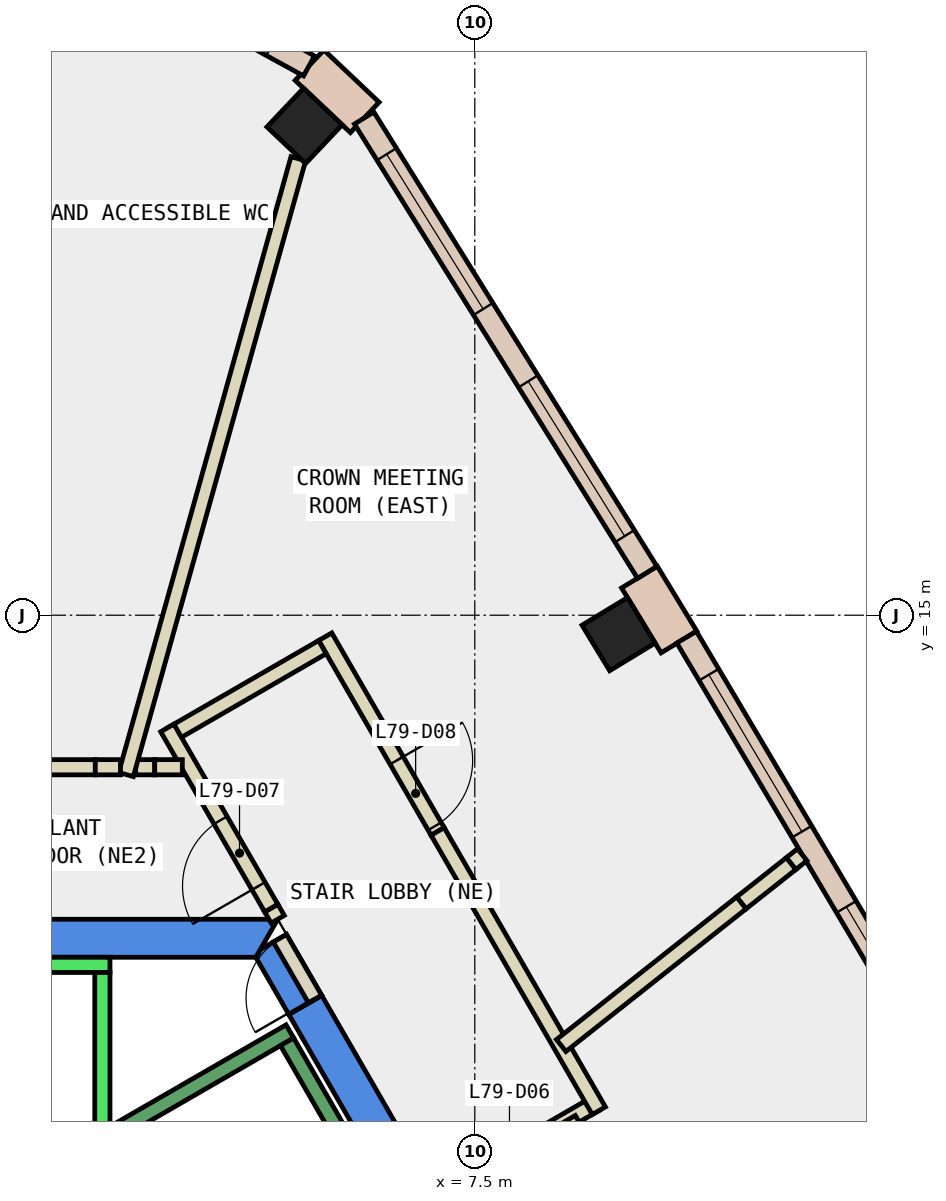
"""IFC4 building model, lengths in metres.
Left out: names, types, materials, properties, quantities, classifications, styles, units other than length and angle.
Written with IfcOpenShell. Run it as: python <this file> out.ifc"""

import sys

from ifc_helpers import new_model, si_unit, direction, frame, frame_2d, origin, origin_2d, place, context, subcontext, project, spatial, polyline, rectangle, outline, extrude, element, fill, save


model = new_model("IFC4")
c1 = context("Model", 3, precision=1e-05, world=origin(), true_north=direction((0.0, 1.0)))
c2 = subcontext(c1, "Body", "Model", "MODEL_VIEW")
j1 = project(units=[si_unit("LENGTHUNIT", "METRE"), si_unit("PLANEANGLEUNIT", "RADIAN")], contexts=[c1])
p1 = place(None, origin())
s1 = spatial("IfcSite", under=j1, at=p1, CompositionType="ELEMENT")
p2 = place(p1, origin())
s2 = spatial("IfcBuilding", under=s1, at=p2, CompositionType="ELEMENT")
p3 = place(p2, frame((0.0, 0.0, 335.9)))
s3 = spatial("IfcBuildingStorey", under=s2, at=p3, CompositionType="ELEMENT", Elevation=335.9)
for number, where, z_axis, x_axis in (
    (1, (9.392, 14.751, -0.35), (0.0, 0.0, 1.0), (-0.519, 0.855, 0.0)),
    (2, (5.26, 21.438, -0.35), (0.0, 0.0, 1.0), (-0.727, 0.687, 0.0)),
):
    element("IfcColumn", number, at=place(p3, frame(where, z_axis=z_axis, x_axis=x_axis)), inside=s3, PredefinedType="COLUMN", context=c2, shape_type="SweptSolid", body=[
        extrude(rectangle(XDim=0.7, YDim=0.7, at=origin_2d()), origin(), (0.0, 0.0, 1.0), 4.4),
    ])
p4 = place(p3, frame((0.0, 0.0, -0.35)))
e3 = element("IfcWall", 3, at=p4, inside=s3, PredefinedType="SHEAR", context=c2, shape_type="SweptSolid", body=[
    extrude(outline(polyline([(5.486, 9.998), (5.053, 9.748), (9.238, 2.5), (9.815, 2.5), (5.486, 9.998)])), origin(), (0.0, 0.0, 1.0), 4.4),
])
p5 = place(p3, frame((0.0, 0.0, 3.6)))
e4 = element("IfcWall", 4, at=p5, inside=s3, PredefinedType="SHEAR", context=c2, shape_type="SweptSolid", body=[
    extrude(outline(polyline([(5.022, 10.8), (4.677, 10.601), (4.619, 10.5), (5.053, 9.748), (5.486, 9.998), (5.022, 10.8)])), origin(), (0.0, 0.0, 1.0), 0.45),
])
p6 = place(p3, frame((0.0, 0.0, -0.35)))
e5 = element("IfcWall", 5, at=p6, inside=s3, PredefinedType="SHEAR", context=c2, shape_type="SweptSolid", body=[
    extrude(outline(polyline([(4.907, 11.0), (-4.907, 11.0), (-4.619, 10.5), (4.619, 10.5), (4.907, 11.0)])), origin(), (0.0, 0.0, 1.0), 4.4),
])
p7 = place(p3, frame((10.186, 14.648, 0.0), z_axis=(0.0, 0.0, 1.0), x_axis=(-0.520086370604, 0.854113673414, 0.0)))
e6 = element("IfcWall", 6, at=p7, inside=s3, PredefinedType="STANDARD", context=c2, shape_type="SweptSolid", body=[
    extrude(rectangle(XDim=1.0, YDim=0.55, at=frame_2d((0.5, 0.0))), origin(), (0.0, 0.0, 1.0), 4.05),
])
p8 = place(p3, frame((6.052, 21.549, 0.0), z_axis=(0.0, 0.0, 1.0), x_axis=(-0.726376136967, 0.687297393888, 0.0)))
e7 = element("IfcWall", 7, at=p8, inside=s3, PredefinedType="STANDARD", context=c2, shape_type="SweptSolid", body=[
    extrude(rectangle(XDim=1.0, YDim=0.55, at=frame_2d((0.5, 0.0))), origin(), (0.0, 0.0, 1.0), 4.05),
])
p9 = place(p3, frame((13.905, 8.604, 0.0), z_axis=(0.0, 0.0, 1.0), x_axis=(-0.509697735304, 0.86035354281, 0.0)))
e8 = element("IfcWall", 8, at=p9, inside=s3, PredefinedType="STANDARD", context=c2, shape_type="SweptSolid", body=[
    extrude(rectangle(XDim=7.098, YDim=0.3, at=frame_2d((3.549, 0.0))), origin(), (0.0, 0.0, 1.0), 4.05),
])
p10 = place(p9, frame((0.575, 0.0, 0.9)))
e9 = element("IfcOpeningElement", 9, at=p10, cuts=e8, PredefinedType="OPENING", context=c2, shape_type="SweptSolid", body=[
    extrude(rectangle(XDim=2.4, YDim=3.0, at=frame_2d((1.2, 1.5))), frame((0.0, 0.16, 0.0), z_axis=(0.0, -1.0, 0.0), x_axis=(1.0, 0.0, 0.0)), (0.0, 0.0, 1.0), 0.32),
])
p11 = place(p9, frame((4.124, 0.0, 0.9)))
e10 = element("IfcOpeningElement", 10, at=p11, cuts=e8, PredefinedType="OPENING", context=c2, shape_type="SweptSolid", body=[
    extrude(rectangle(XDim=2.4, YDim=3.0, at=frame_2d((1.2, 1.5))), frame((0.0, 0.16, 0.0), z_axis=(0.0, -1.0, 0.0), x_axis=(1.0, 0.0, 0.0)), (0.0, 0.0, 1.0), 0.32),
])
p12 = place(p3, frame((9.769, 15.564, 0.0), z_axis=(0.0, 0.0, 1.0), x_axis=(-0.528920387505, 0.848671446251, 0.0)))
e11 = element("IfcWall", 11, at=p12, inside=s3, PredefinedType="STANDARD", context=c2, shape_type="SweptSolid", body=[
    extrude(rectangle(XDim=7.043, YDim=0.3, at=frame_2d((3.521, 0.0))), origin(), (0.0, 0.0, 1.0), 4.05),
])
p13 = place(p12, frame((0.561, 0.0, 0.9)))
e12 = element("IfcOpeningElement", 12, at=p13, cuts=e11, PredefinedType="OPENING", context=c2, shape_type="SweptSolid", body=[
    extrude(rectangle(XDim=2.4, YDim=3.0, at=frame_2d((1.2, 1.5))), frame((0.0, 0.16, 0.0), z_axis=(0.0, -1.0, 0.0), x_axis=(1.0, 0.0, 0.0)), (0.0, 0.0, 1.0), 0.32),
])
p14 = place(p12, frame((4.082, 0.0, 0.9)))
e13 = element("IfcOpeningElement", 13, at=p14, cuts=e11, PredefinedType="OPENING", context=c2, shape_type="SweptSolid", body=[
    extrude(rectangle(XDim=2.4, YDim=3.0, at=frame_2d((1.2, 1.5))), frame((0.0, 0.16, 0.0), z_axis=(0.0, -1.0, 0.0), x_axis=(1.0, 0.0, 0.0)), (0.0, 0.0, 1.0), 0.32),
])
p15 = place(p3, frame((5.319, 22.227, 0.0), z_axis=(0.0, 0.0, 1.0), x_axis=(-0.877068569324, 0.480365199305, 0.0)))
e14 = element("IfcWall", 14, at=p15, inside=s3, PredefinedType="STANDARD", context=c2, shape_type="SweptSolid", body=[
    extrude(rectangle(XDim=5.04, YDim=0.3, at=frame_2d((2.52, 0.0))), origin(), (0.0, 0.0, 1.0), 4.05),
])
p16 = place(p15, frame((0.56, 0.0, 0.9)))
e15 = element("IfcOpeningElement", 15, at=p16, cuts=e14, PredefinedType="OPENING", context=c2, shape_type="SweptSolid", body=[
    extrude(rectangle(XDim=1.4, YDim=3.0, at=frame_2d((0.7, 1.5))), frame((0.0, 0.16, 0.0), z_axis=(0.0, -1.0, 0.0), x_axis=(1.0, 0.0, 0.0)), (0.0, 0.0, 1.0), 0.32),
])
p17 = place(p15, frame((3.08, 0.0, 0.9)))
e16 = element("IfcOpeningElement", 16, at=p17, cuts=e14, PredefinedType="OPENING", context=c2, shape_type="SweptSolid", body=[
    extrude(rectangle(XDim=1.4, YDim=3.0, at=frame_2d((0.7, 1.5))), frame((0.0, 0.16, 0.0), z_axis=(0.0, -1.0, 0.0), x_axis=(1.0, 0.0, 0.0)), (0.0, 0.0, 1.0), 0.32),
])
p18 = place(p3, frame((9.082, 8.568, 0.0), z_axis=(0.0, 0.0, 1.0), x_axis=(-0.865955154139, -0.50012165622, 0.0)))
e17 = element("IfcWall", 17, at=p18, inside=s3, PredefinedType="PARTITIONING", context=c2, shape_type="SweptSolid", body=[
    extrude(rectangle(XDim=2.4, YDim=0.2, at=frame_2d((1.2, 0.0))), origin(), (0.0, 0.0, 1.0), 4.05),
])
p19 = place(p18, frame((0.8, 0.0, 0.0)))
e18 = element("IfcOpeningElement", 18, at=p19, cuts=e17, PredefinedType="OPENING", context=c2, shape_type="SweptSolid", body=[
    extrude(rectangle(XDim=1.0, YDim=2.1, at=frame_2d((0.5, 1.05))), frame((0.0, 0.11, 0.0), z_axis=(0.0, -1.0, 0.0), x_axis=(1.0, 0.0, 0.0)), (0.0, 0.0, 1.0), 0.22),
])
p20 = place(p3, frame((4.907, 11.0, 0.0), z_axis=(0.0, 0.0, 1.0), x_axis=(-0.5004692653, 0.865754303766, 0.0)))
e19 = element("IfcWall", 19, at=p20, inside=s3, PredefinedType="PARTITIONING", context=c2, shape_type="SweptSolid", body=[
    extrude(rectangle(XDim=0.17, YDim=0.2, at=frame_2d((0.085, 0.0))), origin(), (0.0, 0.0, 1.0), 2.4),
])
p21 = place(p3, frame((5.532, 14.717, 0.0), z_axis=(0.0, 0.0, 1.0), x_axis=(0.499955822529, -0.866050908157, 0.0)))
e20 = element("IfcWall", 20, at=p21, inside=s3, PredefinedType="PARTITIONING", context=c2, shape_type="SweptSolid", body=[
    extrude(rectangle(XDim=2.958, YDim=0.2, at=frame_2d((1.479, 0.0))), origin(), (0.0, 0.0, 1.0), 4.05),
])
p22 = place(p21, frame((1.88, 0.0, 0.0)))
e21 = element("IfcOpeningElement", 21, at=p22, cuts=e20, PredefinedType="OPENING", context=c2, shape_type="SweptSolid", body=[
    extrude(rectangle(XDim=1.0, YDim=2.1, at=frame_2d((0.5, 1.05))), frame((0.0, 0.11, 0.0), z_axis=(0.0, -1.0, 0.0), x_axis=(1.0, 0.0, 0.0)), (0.0, 0.0, 1.0), 0.22),
])
p23 = place(p3, frame((3.504, 13.43, 0.0), z_axis=(0.0, 0.0, 1.0), x_axis=(0.865927408828, 0.500169693844, 0.0)))
e22 = element("IfcWall", 22, at=p23, inside=s3, PredefinedType="PARTITIONING", context=c2, shape_type="SweptSolid", body=[
    extrude(rectangle(XDim=2.3, YDim=0.2, at=frame_2d((1.15, 0.0))), origin(), (0.0, 0.0, 1.0), 4.05),
])
p24 = place(p3, frame((8.736, 8.368, 0.0), z_axis=(0.0, 0.0, 1.0), x_axis=(0.500206302225, -0.865906262372, 0.0)))
e23 = element("IfcWall", 23, at=p24, inside=s3, PredefinedType="PARTITIONING", context=c2, shape_type="SweptSolid", body=[
    extrude(rectangle(XDim=2.111, YDim=0.2, at=frame_2d((1.055, 0.0))), origin(), (0.0, 0.0, 1.0), 4.05),
])
p25 = place(p3, frame((3.038, 13.0, 0.0), z_axis=(0.0, 0.0, 1.0), x_axis=(1.0, 0.0, 0.0)))
e24 = element("IfcWall", 24, at=p25, inside=s3, PredefinedType="PARTITIONING", context=c2, shape_type="SweptSolid", body=[
    extrude(rectangle(XDim=0.251, YDim=0.2, at=frame_2d((0.125, 0.0))), origin(), (0.0, 0.0, 1.0), 1.95),
])
p26 = place(p3, frame((11.808, 11.849, 0.0), z_axis=(0.0, 0.0, 1.0), x_axis=(-0.782385511742, -0.622794437207, 0.0)))
e25 = element("IfcWall", 25, at=p26, inside=s3, PredefinedType="PARTITIONING", context=c2, shape_type="SweptSolid", body=[
    extrude(rectangle(XDim=0.188, YDim=0.2, at=frame_2d((0.094, 0.0))), origin(), (0.0, 0.0, 1.0), 4.05),
])
p27 = place(p3, frame((2.911, 12.904, 0.0), z_axis=(0.0, 0.0, 1.0), x_axis=(0.269466315524, 0.963009815525, 0.0)))
e26 = element("IfcWall", 26, at=p27, inside=s3, PredefinedType="PARTITIONING", context=c2, shape_type="SweptSolid", body=[
    extrude(rectangle(XDim=8.413, YDim=0.2, at=frame_2d((4.207, 0.0))), origin(), (0.0, 0.0, 1.0), 1.95),
])
p28 = place(p3, frame((5.399, 9.948, 0.0), z_axis=(0.0, 0.0, 1.0), x_axis=(-0.499882215713, 0.866093395895, 0.0)))
e27 = element("IfcWall", 27, at=p28, inside=s3, PredefinedType="PARTITIONING", context=c2, shape_type="SweptSolid", body=[
    extrude(rectangle(XDim=0.926, YDim=0.2, at=frame_2d((0.463, 0.0))), origin(), (0.0, 0.0, 1.0), 2.4),
])
p29 = place(p28, frame((0.017, 0.0, 0.0)))
e28 = element("IfcOpeningElement", 28, at=p29, cuts=e27, PredefinedType="OPENING", context=c2, shape_type="SweptSolid", body=[
    extrude(rectangle(XDim=0.9, YDim=2.1, at=frame_2d((0.45, 1.05))), frame((0.0, 0.11, 0.0), z_axis=(0.0, -1.0, 0.0), x_axis=(1.0, 0.0, 0.0)), (0.0, 0.0, 1.0), 0.22),
])
p30 = place(p3, frame((4.822, 11.147, 0.0), z_axis=(0.0, 0.0, 1.0), x_axis=(-0.499871764879, 0.866099427708, 0.0)))
e29 = element("IfcWall", 29, at=p30, inside=s3, PredefinedType="PARTITIONING", context=c2, shape_type="SweptSolid", body=[
    extrude(rectangle(XDim=2.737, YDim=0.2, at=frame_2d((1.368, 0.0))), origin(), (0.0, 0.0, 1.0), 4.05),
])
p31 = place(p30, frame((0.335, 0.0, 0.0)))
e30 = element("IfcOpeningElement", 30, at=p31, cuts=e29, PredefinedType="OPENING", context=c2, shape_type="SweptSolid", body=[
    extrude(rectangle(XDim=1.0, YDim=2.1, at=frame_2d((0.5, 1.05))), frame((0.0, 0.11, 0.0), z_axis=(0.0, -1.0, 0.0), x_axis=(1.0, 0.0, 0.0)), (0.0, 0.0, 1.0), 0.22),
])
p32 = place(p3, frame((7.011, 12.155, 0.0), z_axis=(0.0, 0.0, 1.0), x_axis=(0.499772878723, -0.866156492612, 0.0)))
e31 = element("IfcWall", 31, at=p32, inside=s3, PredefinedType="PARTITIONING", context=c2, shape_type="SweptSolid", body=[
    extrude(rectangle(XDim=0.838, YDim=0.2, at=frame_2d((0.419, 0.0))), origin(), (0.0, 0.0, 1.0), 1.95),
])
p33 = place(p3, frame((7.43, 11.429, 0.0), z_axis=(0.0, 0.0, 1.0), x_axis=(0.500026652407, -0.866010015463, 0.0)))
e32 = element("IfcWall", 32, at=p33, inside=s3, PredefinedType="PARTITIONING", context=c2, shape_type="SweptSolid", body=[
    extrude(rectangle(XDim=3.404, YDim=0.2, at=frame_2d((1.702, 0.0))), origin(), (0.0, 0.0, 1.0), 4.05),
])
p34 = place(p3, frame((3.289, 13.0, 0.0), z_axis=(0.0, 0.0, 1.0), x_axis=(1.0, 0.0, 0.0)))
e33 = element("IfcWall", 33, at=p34, inside=s3, PredefinedType="PARTITIONING", context=c2, shape_type="SweptSolid", body=[
    extrude(rectangle(XDim=0.363, YDim=0.2, at=frame_2d((0.182, 0.0))), origin(), (0.0, 0.0, 1.0), 4.05),
])
p35 = place(p3, frame((0.35, 13.0, 0.0), z_axis=(0.0, 0.0, 1.0), x_axis=(1.0, 0.0, 0.0)))
e34 = element("IfcWall", 34, at=p35, inside=s3, PredefinedType="PARTITIONING", context=c2, shape_type="SweptSolid", body=[
    extrude(rectangle(XDim=2.157, YDim=0.2, at=frame_2d((1.079, 0.0))), origin(), (0.0, 0.0, 1.0), 4.05),
])
p36 = place(p35, frame((0.509, 0.0, 0.0)))
e35 = element("IfcOpeningElement", 35, at=p36, cuts=e34, PredefinedType="OPENING", context=c2, shape_type="SweptSolid", body=[
    extrude(rectangle(XDim=1.0, YDim=2.1, at=frame_2d((0.5, 1.05))), frame((0.0, 0.11, 0.0), z_axis=(0.0, -1.0, 0.0), x_axis=(1.0, 0.0, 0.0)), (0.0, 0.0, 1.0), 0.22),
])
p37 = place(p3, frame((2.507, 13.0, 0.0), z_axis=(0.0, 0.0, 1.0), x_axis=(1.0, 0.0, 0.0)))
e36 = element("IfcWall", 36, at=p37, inside=s3, PredefinedType="PARTITIONING", context=c2, shape_type="SweptSolid", body=[
    extrude(rectangle(XDim=0.331, YDim=0.2, at=frame_2d((0.166, 0.0))), origin(), (0.0, 0.0, 1.0), 1.95),
])
p38 = place(p3, frame((11.661, 11.732, 0.0), z_axis=(0.0, 0.0, 1.0), x_axis=(-0.784485189624, -0.620147552813, 0.0)))
e37 = element("IfcWall", 37, at=p38, inside=s3, PredefinedType="PARTITIONING", context=c2, shape_type="SweptSolid", body=[
    extrude(rectangle(XDim=0.833, YDim=0.2, at=frame_2d((0.417, 0.0))), origin(), (0.0, 0.0, 1.0), 1.95),
])
p39 = place(p3, frame((11.007, 11.215, 0.0), z_axis=(0.0, 0.0, 1.0), x_axis=(-0.784104781382, -0.620628465198, 0.0)))
e38 = element("IfcWall", 38, at=p39, inside=s3, PredefinedType="PARTITIONING", context=c2, shape_type="SweptSolid", body=[
    extrude(rectangle(XDim=3.023, YDim=0.2, at=frame_2d((1.511, 0.0))), origin(), (0.0, 0.0, 1.0), 4.05),
])
p40 = place(p3, frame((2.7, 10.4, 0.0), z_axis=(0.0, 0.0, 1.0), x_axis=(-1.0, 0.0, 0.0)))
e39 = element("IfcWall", 39, at=p40, inside=s3, PredefinedType="STANDARD", context=c2, shape_type="SweptSolid", body=[
    extrude(rectangle(XDim=5.4, YDim=0.2, at=frame_2d((2.7, 0.0))), origin(), (0.0, 0.0, 1.0), 4.05),
])
p41 = place(p3, frame((2.6, 7.9, 0.0), z_axis=(0.0, 0.0, 1.0), x_axis=(0.0, 1.0, 0.0)))
e40 = element("IfcWall", 40, at=p41, inside=s3, PredefinedType="STANDARD", context=c2, shape_type="SweptSolid", body=[
    extrude(rectangle(XDim=2.4, YDim=0.2, at=frame_2d((1.2, 0.0))), origin(), (0.0, 0.0, 1.0), 4.05),
])
p42 = place(p3, frame((2.7, 8.158, 0.0), z_axis=(0.0, 0.0, 1.0), x_axis=(0.86611865017, 0.499838457731, 0.0)))
e41 = element("IfcWall", 41, at=p42, inside=s3, PredefinedType="STANDARD", context=c2, shape_type="SweptSolid", body=[
    extrude(rectangle(XDim=2.733, YDim=0.2, at=frame_2d((1.366, 0.0))), origin(), (0.0, 0.0, 1.0), 4.05),
])
p43 = place(p3, frame((8.48, 3.412, 0.0), z_axis=(0.0, 0.0, 1.0), x_axis=(-0.499978703459, 0.866037698999, 0.0)))
e42 = element("IfcWall", 42, at=p43, inside=s3, PredefinedType="STANDARD", context=c2, shape_type="SweptSolid", body=[
    extrude(rectangle(XDim=6.9, YDim=0.2, at=frame_2d((3.45, 0.0))), origin(), (0.0, 0.0, 1.0), 4.05),
])
p44 = place(p10, origin())
e43 = element("IfcWindow", 43, at=p44, inside=s3, PartitioningType="SINGLE_PANEL", PredefinedType="WINDOW", context=c2, shape_type="SweptSolid", body=[
    extrude(rectangle(XDim=2.4, YDim=3.0, at=frame_2d((1.2, 1.5))), frame((0.0, 0.03, 0.0), z_axis=(0.0, -1.0, 0.0), x_axis=(1.0, 0.0, 0.0)), (0.0, 0.0, 1.0), 0.06),
])
fill(e9, e43)
p45 = place(p11, origin())
e44 = element("IfcWindow", 44, at=p45, inside=s3, PartitioningType="SINGLE_PANEL", PredefinedType="WINDOW", context=c2, shape_type="SweptSolid", body=[
    extrude(rectangle(XDim=2.4, YDim=3.0, at=frame_2d((1.2, 1.5))), frame((0.0, 0.03, 0.0), z_axis=(0.0, -1.0, 0.0), x_axis=(1.0, 0.0, 0.0)), (0.0, 0.0, 1.0), 0.06),
])
fill(e10, e44)
p46 = place(p13, origin())
e45 = element("IfcWindow", 45, at=p46, inside=s3, PartitioningType="SINGLE_PANEL", PredefinedType="WINDOW", context=c2, shape_type="SweptSolid", body=[
    extrude(rectangle(XDim=2.4, YDim=3.0, at=frame_2d((1.2, 1.5))), frame((0.0, 0.03, 0.0), z_axis=(0.0, -1.0, 0.0), x_axis=(1.0, 0.0, 0.0)), (0.0, 0.0, 1.0), 0.06),
])
fill(e12, e45)
p47 = place(p14, origin())
e46 = element("IfcWindow", 46, at=p47, inside=s3, PartitioningType="SINGLE_PANEL", PredefinedType="WINDOW", context=c2, shape_type="SweptSolid", body=[
    extrude(rectangle(XDim=2.4, YDim=3.0, at=frame_2d((1.2, 1.5))), frame((0.0, 0.03, 0.0), z_axis=(0.0, -1.0, 0.0), x_axis=(1.0, 0.0, 0.0)), (0.0, 0.0, 1.0), 0.06),
])
fill(e13, e46)
p48 = place(p31, origin())
e47 = element("IfcDoor", 47, at=p48, inside=s3, OperationType="SINGLE_SWING_RIGHT", PredefinedType="DOOR", context=c2, shape_type="SweptSolid", body=[
    extrude(rectangle(XDim=1.0, YDim=2.1, at=frame_2d((0.5, 1.05))), frame((0.0, 0.025, 0.0), z_axis=(0.0, -1.0, 0.0), x_axis=(1.0, 0.0, 0.0)), (0.0, 0.0, 1.0), 0.05),
])
fill(e30, e47)
p49 = place(p22, origin())
e48 = element("IfcDoor", 48, at=p49, inside=s3, OperationType="SINGLE_SWING_LEFT", PredefinedType="DOOR", context=c2, shape_type="SweptSolid", body=[
    extrude(rectangle(XDim=1.0, YDim=2.1, at=frame_2d((0.5, 1.05))), frame((0.0, 0.025, 0.0), z_axis=(0.0, -1.0, 0.0), x_axis=(1.0, 0.0, 0.0)), (0.0, 0.0, 1.0), 0.05),
])
fill(e21, e48)
p50 = place(p29, origin())
e49 = element("IfcDoor", 49, at=p50, inside=s3, OperationType="SINGLE_SWING_LEFT", PredefinedType="DOOR", context=c2, shape_type="SweptSolid", body=[
    extrude(rectangle(XDim=0.9, YDim=2.1, at=frame_2d((0.45, 1.05))), frame((0.0, 0.025, 0.0), z_axis=(0.0, -1.0, 0.0), x_axis=(1.0, 0.0, 0.0)), (0.0, 0.0, 1.0), 0.05),
])
fill(e28, e49)
save(model, sys.argv[1])
